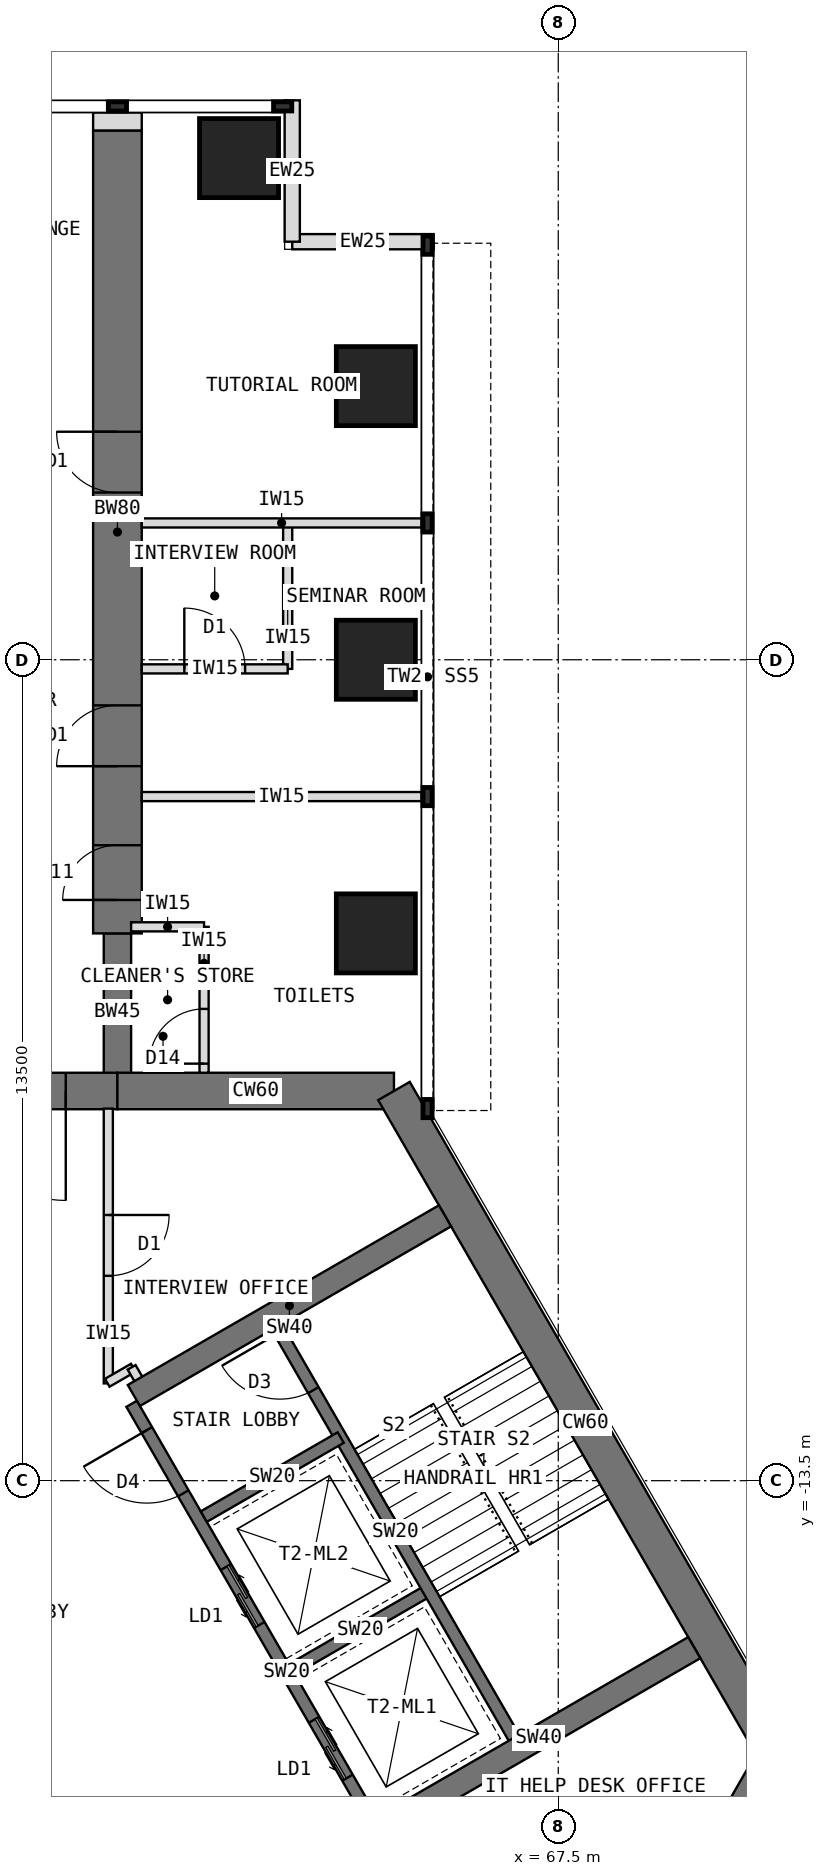
"""IFC4 building model, lengths in metres.
Left out: names, types, materials, properties, quantities, classifications, styles, units other than length and angle.
Written with IfcOpenShell. Run it as: python <this file> out.ifc"""

import sys

from ifc_helpers import new_model, si_unit, direction, frame, frame_2d, origin, origin_2d, place, context, subcontext, project, spatial, rectangle, extrude, element, fill, save


model = new_model("IFC4")
c1 = context("Model", 3, precision=1e-05, world=origin(), true_north=direction((0.0, 1.0)))
c2 = subcontext(c1, "Body", "Model", "MODEL_VIEW")
j1 = project(units=[si_unit("LENGTHUNIT", "METRE"), si_unit("PLANEANGLEUNIT", "RADIAN")], contexts=[c1])
p1 = place(None, origin())
s1 = spatial("IfcSite", under=j1, at=p1, CompositionType="ELEMENT")
p2 = place(p1, origin())
s2 = spatial("IfcBuilding", under=s1, at=p2, CompositionType="ELEMENT")
p3 = place(p2, frame((0.0, 0.0, 125.5)))
s3 = spatial("IfcBuildingStorey", under=s2, at=p3, CompositionType="ELEMENT", Elevation=125.5)
p4 = place(p3, frame((64.798, -7.092, 0.0), z_axis=(0.0, 0.0, 1.0), x_axis=(-1.0, 0.0, 0.0)))
e1 = element("IfcWall", 1, at=p4, inside=s3, PredefinedType="SHEAR", context=c2, shape_type="SweptSolid", body=[
    extrude(rectangle(XDim=4.548, YDim=0.6, at=frame_2d((2.274, 0.0))), origin(), (0.0, 0.0, 1.0), 4.0),
])
p5 = place(p3, frame((60.25, -7.092, 0.0), z_axis=(0.0, 0.0, 1.0), x_axis=(-1.0, 0.0, 0.0)))
e2 = element("IfcWall", 2, at=p5, inside=s3, PredefinedType="SHEAR", context=c2, shape_type="SweptSolid", body=[
    extrude(rectangle(XDim=3.5, YDim=0.6, at=frame_2d((1.75, 0.0))), origin(), (0.0, 0.0, 1.0), 4.0),
])
p6 = place(p5, frame((0.85, 0.0, 0.0)))
e3 = element("IfcOpeningElement", 3, at=p6, cuts=e2, PredefinedType="OPENING", context=c2, shape_type="SweptSolid", body=[
    extrude(rectangle(XDim=1.8, YDim=2.1, at=frame_2d((0.9, 1.05))), frame((0.0, 0.31, 0.0), z_axis=(0.0, -1.0, 0.0), x_axis=(1.0, 0.0, 0.0)), (0.0, 0.0, 1.0), 0.62),
])
p7 = place(p3, frame((68.822, -21.939, 0.0), z_axis=(0.0, 0.0, 1.0), x_axis=(0.500024481964, 0.866011268655, 0.0)))
e4 = element("IfcWall", 4, at=p7, inside=s3, PredefinedType="SHEAR", context=c2, shape_type="SweptSolid", body=[
    extrude(rectangle(XDim=4.548, YDim=0.6, at=frame_2d((2.274, 0.0))), origin(), (0.0, 0.0, 1.0), 4.0),
])
p8 = place(p3, frame((71.096, -18.0, 0.0), z_axis=(0.0, 0.0, 1.0), x_axis=(-0.500005998175, 0.866021940709, 0.0)))
e5 = element("IfcWall", 5, at=p8, inside=s3, PredefinedType="SHEAR", context=c2, shape_type="SweptSolid", body=[
    extrude(rectangle(XDim=12.596, YDim=0.6, at=frame_2d((6.298, 0.0))), origin(), (0.0, 0.0, 1.0), 4.0),
])
p9 = place(p3, frame((60.25, -7.092, 0.0), z_axis=(0.0, 0.0, 1.0), x_axis=(0.0, 1.0, 0.0)))
e6 = element("IfcWall", 6, at=p9, inside=s3, PredefinedType="SHEAR", context=c2, shape_type="SweptSolid", body=[
    extrude(rectangle(XDim=2.592, YDim=0.45, at=frame_2d((1.296, 0.0))), origin(), (0.0, 0.0, 1.0), 4.0),
])
p10 = place(p3, frame((60.25, -4.5, 0.0), z_axis=(0.0, 0.0, 1.0), x_axis=(0.0, 1.0, 0.0)))
e7 = element("IfcWall", 7, at=p10, inside=s3, PredefinedType="SHEAR", context=c2, shape_type="SweptSolid", body=[
    extrude(rectangle(XDim=13.2, YDim=0.8, at=frame_2d((6.6, 0.0))), origin(), (0.0, 0.0, 1.0), 4.0),
])
p11 = place(p10, frame((0.55, 0.0, 0.0)))
e8 = element("IfcOpeningElement", 8, at=p11, cuts=e7, PredefinedType="OPENING", context=c2, shape_type="SweptSolid", body=[
    extrude(rectangle(XDim=0.9, YDim=2.1, at=frame_2d((0.45, 1.05))), frame((0.0, 0.41, 0.0), z_axis=(0.0, -1.0, 0.0), x_axis=(1.0, 0.0, 0.0)), (0.0, 0.0, 1.0), 0.82),
])
p12 = place(p10, frame((2.75, 0.0, 0.0)))
e9 = element("IfcOpeningElement", 9, at=p12, cuts=e7, PredefinedType="OPENING", context=c2, shape_type="SweptSolid", body=[
    extrude(rectangle(XDim=1.0, YDim=2.1, at=frame_2d((0.5, 1.05))), frame((0.0, 0.41, 0.0), z_axis=(0.0, -1.0, 0.0), x_axis=(1.0, 0.0, 0.0)), (0.0, 0.0, 1.0), 0.82),
])
p13 = place(p10, frame((7.25, 0.0, 0.0)))
e10 = element("IfcOpeningElement", 10, at=p13, cuts=e7, PredefinedType="OPENING", context=c2, shape_type="SweptSolid", body=[
    extrude(rectangle(XDim=1.0, YDim=2.1, at=frame_2d((0.5, 1.05))), frame((0.0, 0.41, 0.0), z_axis=(0.0, -1.0, 0.0), x_axis=(1.0, 0.0, 0.0)), (0.0, 0.0, 1.0), 0.82),
])
for number, where, z_axis, x_axis in (
    (11, (64.5, -4.5, 0.0), (0.0, 0.0, 1.0), (1.0, 0.0, 0.0)),
    (12, (64.5, 0.0, 0.0), (0.0, 0.0, 1.0), (1.0, 0.0, 0.0)),
    (13, (64.5, 4.5, 0.0), (0.0, 0.0, 1.0), (1.0, 0.0, 0.0)),
    (14, (62.25, 8.25, 0.0), (0.0, 0.0, 1.0), (1.0, 0.0, 0.0)),
):
    element("IfcColumn", number, at=place(p3, frame(where, z_axis=z_axis, x_axis=x_axis)), inside=s3, PredefinedType="COLUMN", context=c2, shape_type="SweptSolid", body=[
        extrude(rectangle(XDim=1.3, YDim=1.3, at=origin_2d()), origin(), (0.0, 0.0, 1.0), 4.0),
    ])
for number, where, z_axis, x_axis in (
    (15, (65.45, 6.875, 0.0), (0.0, 0.0, 1.0), (-1.0, 0.0, 0.0)),
    (16, (63.125, 6.875, 0.0), (0.0, 0.0, 1.0), (0.0, 1.0, 0.0)),
):
    element("IfcWall", number, at=place(p3, frame(where, z_axis=z_axis, x_axis=x_axis)), inside=s3, PredefinedType="STANDARD", context=c2, shape_type="SweptSolid", body=[
        extrude(rectangle(XDim=2.325, YDim=0.25, at=frame_2d((1.163, 0.0))), origin(), (0.0, 0.0, 1.0), 3.8),
    ])
p14 = place(p3, frame((60.25, 8.7, 0.0), z_axis=(0.0, 0.0, 1.0), x_axis=(0.0, 1.0, 0.0)))
e17 = element("IfcWall", 17, at=p14, inside=s3, PredefinedType="PARTITIONING", context=c2, shape_type="SweptSolid", body=[
    extrude(rectangle(XDim=0.3, YDim=0.8, at=frame_2d((0.15, 0.0))), origin(), (0.0, 0.0, 1.0), 3.8),
])
p15 = place(p3, frame((64.484, -19.164, 0.0), z_axis=(0.0, 0.0, 1.0), x_axis=(-0.49999894854, 0.866026010844, 0.0)))
e18 = element("IfcWall", 18, at=p15, inside=s3, PredefinedType="SHEAR", context=c2, shape_type="SweptSolid", body=[
    extrude(rectangle(XDim=8.0, YDim=0.2, at=frame_2d((4.0, 0.0))), origin(), (0.0, 0.0, 1.0), 4.0),
])
p16 = place(p15, frame((6.3, 0.0, 0.0)))
e19 = element("IfcOpeningElement", 19, at=p16, cuts=e18, PredefinedType="OPENING", context=c2, shape_type="SweptSolid", body=[
    extrude(rectangle(XDim=1.2, YDim=2.1, at=frame_2d((0.6, 1.05))), frame((0.0, 0.11, 0.0), z_axis=(0.0, -1.0, 0.0), x_axis=(1.0, 0.0, 0.0)), (0.0, 0.0, 1.0), 0.22),
])
p17 = place(p15, frame((0.9, 0.0, 0.0)))
e20 = element("IfcOpeningElement", 20, at=p17, cuts=e18, PredefinedType="OPENING", context=c2, shape_type="SweptSolid", body=[
    extrude(rectangle(XDim=1.1, YDim=2.2, at=frame_2d((0.55, 1.1))), frame((0.0, 0.11, 0.0), z_axis=(0.0, -1.0, 0.0), x_axis=(1.0, 0.0, 0.0)), (0.0, 0.0, 1.0), 0.22),
])
p18 = place(p15, frame((3.8, 0.0, 0.0)))
e21 = element("IfcOpeningElement", 21, at=p18, cuts=e18, PredefinedType="OPENING", context=c2, shape_type="SweptSolid", body=[
    extrude(rectangle(XDim=1.1, YDim=2.2, at=frame_2d((0.55, 1.1))), frame((0.0, 0.11, 0.0), z_axis=(0.0, -1.0, 0.0), x_axis=(1.0, 0.0, 0.0)), (0.0, 0.0, 1.0), 0.22),
])
p19 = place(p3, frame((63.12, -16.603, 0.0), z_axis=(0.0, 0.0, 1.0), x_axis=(0.866062058628, 0.499936506574, 0.0)))
e22 = element("IfcWall", 22, at=p19, inside=s3, PredefinedType="SHEAR", context=c2, shape_type="SweptSolid", body=[
    extrude(rectangle(XDim=2.6, YDim=0.2, at=frame_2d((1.3, 0.0))), origin(), (0.0, 0.0, 1.0), 4.0),
])
p20 = place(p3, frame((61.67, -14.091, 0.0), z_axis=(0.0, 0.0, 1.0), x_axis=(0.86603858612, 0.49997716683, 0.0)))
e23 = element("IfcWall", 23, at=p20, inside=s3, PredefinedType="SHEAR", context=c2, shape_type="SweptSolid", body=[
    extrude(rectangle(XDim=2.6, YDim=0.2, at=frame_2d((1.3, 0.0))), origin(), (0.0, 0.0, 1.0), 4.0),
])
p21 = place(p3, frame((66.822, -17.814, 0.0), z_axis=(0.0, 0.0, 1.0), x_axis=(-0.49999894854, 0.866026010844, 0.0)))
e24 = element("IfcWall", 24, at=p21, inside=s3, PredefinedType="SHEAR", context=c2, shape_type="SweptSolid", body=[
    extrude(rectangle(XDim=8.0, YDim=0.2, at=frame_2d((4.0, 0.0))), origin(), (0.0, 0.0, 1.0), 4.0),
])
p22 = place(p21, frame((6.7, 0.0, 0.0)))
e25 = element("IfcOpeningElement", 25, at=p22, cuts=e24, PredefinedType="OPENING", context=c2, shape_type="SweptSolid", body=[
    extrude(rectangle(XDim=1.1, YDim=2.1, at=frame_2d((0.55, 1.05))), frame((0.0, 0.11, 0.0), z_axis=(0.0, -1.0, 0.0), x_axis=(1.0, 0.0, 0.0)), (0.0, 0.0, 1.0), 0.22),
])
p23 = place(p3, frame((60.52, -12.099, 0.0), z_axis=(0.0, 0.0, 1.0), x_axis=(0.866009424208, 0.500027676417, 0.0)))
e26 = element("IfcWall", 26, at=p23, inside=s3, PredefinedType="SHEAR", context=c2, shape_type="SweptSolid", body=[
    extrude(rectangle(XDim=5.908, YDim=0.4, at=frame_2d((2.954, 0.0))), origin(), (0.0, 0.0, 1.0), 4.0),
])
p24 = place(p3, frame((64.62, -19.201, 0.0), z_axis=(0.0, 0.0, 1.0), x_axis=(0.866027317282, 0.49999668571, 0.0)))
e27 = element("IfcWall", 27, at=p24, inside=s3, PredefinedType="SHEAR", context=c2, shape_type="SweptSolid", body=[
    extrude(rectangle(XDim=5.908, YDim=0.4, at=frame_2d((2.954, 0.0))), origin(), (0.0, 0.0, 1.0), 4.0),
])
for number, where, z_axis, x_axis in (
    (28, (60.65, -2.25, 0.0), (0.0, 0.0, 1.0), (1.0, 0.0, 0.0)),
    (29, (60.65, 2.25, 0.0), (0.0, 0.0, 1.0), (1.0, 0.0, 0.0)),
):
    element("IfcWall", number, at=place(p3, frame(where, z_axis=z_axis, x_axis=x_axis)), inside=s3, PredefinedType="PARTITIONING", context=c2, shape_type="SweptSolid", body=[
        extrude(rectangle(XDim=4.6, YDim=0.15, at=frame_2d((2.3, 0.0))), origin(), (0.0, 0.0, 1.0), 3.8),
    ])
p25 = place(p3, frame((63.05, -0.15, 0.0), z_axis=(0.0, 0.0, 1.0), x_axis=(0.0, 1.0, 0.0)))
e30 = element("IfcWall", 30, at=p25, inside=s3, PredefinedType="PARTITIONING", context=c2, shape_type="SweptSolid", body=[
    extrude(rectangle(XDim=2.4, YDim=0.15, at=frame_2d((1.2, 0.0))), origin(), (0.0, 0.0, 1.0), 3.8),
])
p26 = place(p3, frame((60.65, -0.15, 0.0), z_axis=(0.0, 0.0, 1.0), x_axis=(1.0, 0.0, 0.0)))
e31 = element("IfcWall", 31, at=p26, inside=s3, PredefinedType="PARTITIONING", context=c2, shape_type="SweptSolid", body=[
    extrude(rectangle(XDim=2.4, YDim=0.15, at=frame_2d((1.2, 0.0))), origin(), (0.0, 0.0, 1.0), 3.8),
])
p27 = place(p26, frame((0.7, 0.0, 0.0)))
e32 = element("IfcOpeningElement", 32, at=p27, cuts=e31, PredefinedType="OPENING", context=c2, shape_type="SweptSolid", body=[
    extrude(rectangle(XDim=1.0, YDim=2.1, at=frame_2d((0.5, 1.05))), frame((0.0, 0.085, 0.0), z_axis=(0.0, -1.0, 0.0), x_axis=(1.0, 0.0, 0.0)), (0.0, 0.0, 1.0), 0.17),
])
p28 = place(p3, frame((61.675, -6.792, 0.0), z_axis=(0.0, 0.0, 1.0), x_axis=(0.0, 1.0, 0.0)))
e33 = element("IfcWall", 33, at=p28, inside=s3, PredefinedType="PARTITIONING", context=c2, shape_type="SweptSolid", body=[
    extrude(rectangle(XDim=2.4, YDim=0.15, at=frame_2d((1.2, 0.0))), origin(), (0.0, 0.0, 1.0), 3.8),
])
p29 = place(p28, frame((0.15, 0.0, 0.0)))
e34 = element("IfcOpeningElement", 34, at=p29, cuts=e33, PredefinedType="OPENING", context=c2, shape_type="SweptSolid", body=[
    extrude(rectangle(XDim=0.9, YDim=2.1, at=frame_2d((0.45, 1.05))), frame((0.0, 0.085, 0.0), z_axis=(0.0, -1.0, 0.0), x_axis=(1.0, 0.0, 0.0)), (0.0, 0.0, 1.0), 0.17),
])
p30 = place(p3, frame((60.475, -4.392, 0.0), z_axis=(0.0, 0.0, 1.0), x_axis=(1.0, 0.0, 0.0)))
e35 = element("IfcWall", 35, at=p30, inside=s3, PredefinedType="PARTITIONING", context=c2, shape_type="SweptSolid", body=[
    extrude(rectangle(XDim=1.2, YDim=0.15, at=frame_2d((0.6, 0.0))), origin(), (0.0, 0.0, 1.0), 3.8),
])
p31 = place(p3, frame((60.1, -7.382, 0.0), z_axis=(0.0, 0.0, 1.0), x_axis=(0.0, -1.0, 0.0)))
e36 = element("IfcWall", 36, at=p31, inside=s3, PredefinedType="PARTITIONING", context=c2, shape_type="SweptSolid", body=[
    extrude(rectangle(XDim=4.519, YDim=0.15, at=frame_2d((2.259, 0.0))), origin(), (0.0, 0.0, 1.0), 3.8),
])
p32 = place(p31, frame((1.749, 0.0, 0.0)))
e37 = element("IfcOpeningElement", 37, at=p32, cuts=e36, PredefinedType="OPENING", context=c2, shape_type="SweptSolid", body=[
    extrude(rectangle(XDim=1.0, YDim=2.1, at=frame_2d((0.5, 1.05))), frame((0.0, 0.085, 0.0), z_axis=(0.0, -1.0, 0.0), x_axis=(1.0, 0.0, 0.0)), (0.0, 0.0, 1.0), 0.17),
])
p33 = place(p3, frame((60.083, -11.89, 0.0), z_axis=(0.0, 0.0, 1.0), x_axis=(0.865831790172, 0.50033519877, 0.0)))
e38 = element("IfcWall", 38, at=p33, inside=s3, PredefinedType="PARTITIONING", context=c2, shape_type="SweptSolid", body=[
    extrude(rectangle(XDim=0.494, YDim=0.15, at=frame_2d((0.247, 0.0))), origin(), (0.0, 0.0, 1.0), 3.8),
])
p34 = place(p3, frame((60.483, -11.635, 0.0), z_axis=(0.0, 0.0, 1.0), x_axis=(0.500230298122, -0.865892400268, 0.0)))
e39 = element("IfcWall", 39, at=p34, inside=s3, PredefinedType="PARTITIONING", context=c2, shape_type="SweptSolid", body=[
    extrude(rectangle(XDim=0.43, YDim=0.15, at=frame_2d((0.215, 0.0))), origin(), (0.0, 0.0, 1.0), 3.8),
])
p35 = place(p16, origin())
e40 = element("IfcDoor", 40, at=p35, inside=s3, OperationType="SINGLE_SWING_RIGHT", PredefinedType="DOOR", context=c2, shape_type="SweptSolid", body=[
    extrude(rectangle(XDim=1.2, YDim=2.1, at=frame_2d((0.6, 1.05))), frame((0.0, 0.025, 0.0), z_axis=(0.0, -1.0, 0.0), x_axis=(1.0, 0.0, 0.0)), (0.0, 0.0, 1.0), 0.05),
])
fill(e19, e40)
p36 = place(p17, origin())
e41 = element("IfcDoor", 41, at=p36, inside=s3, OperationType="DOUBLE_DOOR_SLIDING", PredefinedType="DOOR", context=c2, shape_type="SweptSolid", body=[
    extrude(rectangle(XDim=1.1, YDim=2.2, at=frame_2d((0.55, 1.1))), frame((0.0, 0.025, 0.0), z_axis=(0.0, -1.0, 0.0), x_axis=(1.0, 0.0, 0.0)), (0.0, 0.0, 1.0), 0.05),
])
fill(e20, e41)
p37 = place(p18, origin())
e42 = element("IfcDoor", 42, at=p37, inside=s3, OperationType="DOUBLE_DOOR_SLIDING", PredefinedType="DOOR", context=c2, shape_type="SweptSolid", body=[
    extrude(rectangle(XDim=1.1, YDim=2.2, at=frame_2d((0.55, 1.1))), frame((0.0, 0.025, 0.0), z_axis=(0.0, -1.0, 0.0), x_axis=(1.0, 0.0, 0.0)), (0.0, 0.0, 1.0), 0.05),
])
fill(e21, e42)
p38 = place(p22, origin())
e43 = element("IfcDoor", 43, at=p38, inside=s3, OperationType="SINGLE_SWING_RIGHT", PredefinedType="DOOR", context=c2, shape_type="SweptSolid", body=[
    extrude(rectangle(XDim=1.1, YDim=2.1, at=frame_2d((0.55, 1.05))), frame((0.0, 0.025, 0.0), z_axis=(0.0, -1.0, 0.0), x_axis=(1.0, 0.0, 0.0)), (0.0, 0.0, 1.0), 0.05),
])
fill(e25, e43)
p39 = place(p6, origin())
e44 = element("IfcDoor", 44, at=p39, inside=s3, OperationType="DOUBLE_DOOR_DOUBLE_SWING", PredefinedType="DOOR", context=c2, shape_type="SweptSolid", body=[
    extrude(rectangle(XDim=1.72, YDim=2.06, at=frame_2d((0.9, 1.03))), frame((0.0, 0.025, 0.0), z_axis=(0.0, -1.0, 0.0), x_axis=(1.0, 0.0, 0.0)), (0.0, 0.0, 1.0), 0.05),
    extrude(rectangle(XDim=0.04, YDim=2.1, at=frame_2d((0.02, 1.05))), frame((0.0, 0.3, 0.0), z_axis=(0.0, -1.0, 0.0), x_axis=(1.0, 0.0, 0.0)), (0.0, 0.0, 1.0), 0.6),
    extrude(rectangle(XDim=0.04, YDim=2.1, at=frame_2d((1.78, 1.05))), frame((0.0, 0.3, 0.0), z_axis=(0.0, -1.0, 0.0), x_axis=(1.0, 0.0, 0.0)), (0.0, 0.0, 1.0), 0.6),
    extrude(rectangle(XDim=1.72, YDim=0.04, at=frame_2d((0.9, 2.08))), frame((0.0, 0.3, 0.0), z_axis=(0.0, -1.0, 0.0), x_axis=(1.0, 0.0, 0.0)), (0.0, 0.0, 1.0), 0.6),
])
fill(e3, e44)
p40 = place(p27, origin())
e45 = element("IfcDoor", 45, at=p40, inside=s3, OperationType="SINGLE_SWING_LEFT", PredefinedType="DOOR", context=c2, shape_type="SweptSolid", body=[
    extrude(rectangle(XDim=1.0, YDim=2.1, at=frame_2d((0.5, 1.05))), frame((0.0, 0.025, 0.0), z_axis=(0.0, -1.0, 0.0), x_axis=(1.0, 0.0, 0.0)), (0.0, 0.0, 1.0), 0.05),
])
fill(e32, e45)
p41 = place(p29, origin())
e46 = element("IfcDoor", 46, at=p41, inside=s3, OperationType="SINGLE_SWING_LEFT", PredefinedType="DOOR", context=c2, shape_type="SweptSolid", body=[
    extrude(rectangle(XDim=0.9, YDim=2.1, at=frame_2d((0.45, 1.05))), frame((0.0, 0.025, 0.0), z_axis=(0.0, -1.0, 0.0), x_axis=(1.0, 0.0, 0.0)), (0.0, 0.0, 1.0), 0.05),
])
fill(e34, e46)
p42 = place(p32, origin())
e47 = element("IfcDoor", 47, at=p42, inside=s3, OperationType="SINGLE_SWING_LEFT", PredefinedType="DOOR", context=c2, shape_type="SweptSolid", body=[
    extrude(rectangle(XDim=1.0, YDim=2.1, at=frame_2d((0.5, 1.05))), frame((0.0, 0.025, 0.0), z_axis=(0.0, -1.0, 0.0), x_axis=(1.0, 0.0, 0.0)), (0.0, 0.0, 1.0), 0.05),
])
fill(e37, e47)
p43 = place(p11, origin())
e48 = element("IfcDoor", 48, at=p43, inside=s3, OperationType="SINGLE_SWING_LEFT", PredefinedType="DOOR", context=c2, shape_type="SweptSolid", body=[
    extrude(rectangle(XDim=0.82, YDim=2.06, at=frame_2d((0.45, 1.03))), frame((0.0, 0.025, 0.0), z_axis=(0.0, -1.0, 0.0), x_axis=(1.0, 0.0, 0.0)), (0.0, 0.0, 1.0), 0.05),
    extrude(rectangle(XDim=0.04, YDim=2.1, at=frame_2d((0.02, 1.05))), frame((0.0, 0.4, 0.0), z_axis=(0.0, -1.0, 0.0), x_axis=(1.0, 0.0, 0.0)), (0.0, 0.0, 1.0), 0.8),
    extrude(rectangle(XDim=0.04, YDim=2.1, at=frame_2d((0.88, 1.05))), frame((0.0, 0.4, 0.0), z_axis=(0.0, -1.0, 0.0), x_axis=(1.0, 0.0, 0.0)), (0.0, 0.0, 1.0), 0.8),
    extrude(rectangle(XDim=0.82, YDim=0.04, at=frame_2d((0.45, 2.08))), frame((0.0, 0.4, 0.0), z_axis=(0.0, -1.0, 0.0), x_axis=(1.0, 0.0, 0.0)), (0.0, 0.0, 1.0), 0.8),
])
fill(e8, e48)
p44 = place(p12, origin())
e49 = element("IfcDoor", 49, at=p44, inside=s3, OperationType="SINGLE_SWING_LEFT", PredefinedType="DOOR", context=c2, shape_type="SweptSolid", body=[
    extrude(rectangle(XDim=0.92, YDim=2.06, at=frame_2d((0.5, 1.03))), frame((0.0, 0.025, 0.0), z_axis=(0.0, -1.0, 0.0), x_axis=(1.0, 0.0, 0.0)), (0.0, 0.0, 1.0), 0.05),
    extrude(rectangle(XDim=0.04, YDim=2.1, at=frame_2d((0.02, 1.05))), frame((0.0, 0.4, 0.0), z_axis=(0.0, -1.0, 0.0), x_axis=(1.0, 0.0, 0.0)), (0.0, 0.0, 1.0), 0.8),
    extrude(rectangle(XDim=0.04, YDim=2.1, at=frame_2d((0.98, 1.05))), frame((0.0, 0.4, 0.0), z_axis=(0.0, -1.0, 0.0), x_axis=(1.0, 0.0, 0.0)), (0.0, 0.0, 1.0), 0.8),
    extrude(rectangle(XDim=0.92, YDim=0.04, at=frame_2d((0.5, 2.08))), frame((0.0, 0.4, 0.0), z_axis=(0.0, -1.0, 0.0), x_axis=(1.0, 0.0, 0.0)), (0.0, 0.0, 1.0), 0.8),
])
fill(e9, e49)
p45 = place(p13, origin())
e50 = element("IfcDoor", 50, at=p45, inside=s3, OperationType="SINGLE_SWING_RIGHT", PredefinedType="DOOR", context=c2, shape_type="SweptSolid", body=[
    extrude(rectangle(XDim=0.92, YDim=2.06, at=frame_2d((0.5, 1.03))), frame((0.0, 0.025, 0.0), z_axis=(0.0, -1.0, 0.0), x_axis=(1.0, 0.0, 0.0)), (0.0, 0.0, 1.0), 0.05),
    extrude(rectangle(XDim=0.04, YDim=2.1, at=frame_2d((0.02, 1.05))), frame((0.0, 0.4, 0.0), z_axis=(0.0, -1.0, 0.0), x_axis=(1.0, 0.0, 0.0)), (0.0, 0.0, 1.0), 0.8),
    extrude(rectangle(XDim=0.04, YDim=2.1, at=frame_2d((0.98, 1.05))), frame((0.0, 0.4, 0.0), z_axis=(0.0, -1.0, 0.0), x_axis=(1.0, 0.0, 0.0)), (0.0, 0.0, 1.0), 0.8),
    extrude(rectangle(XDim=0.92, YDim=0.04, at=frame_2d((0.5, 2.08))), frame((0.0, 0.4, 0.0), z_axis=(0.0, -1.0, 0.0), x_axis=(1.0, 0.0, 0.0)), (0.0, 0.0, 1.0), 0.8),
])
fill(e10, e50)
save(model, sys.argv[1])
